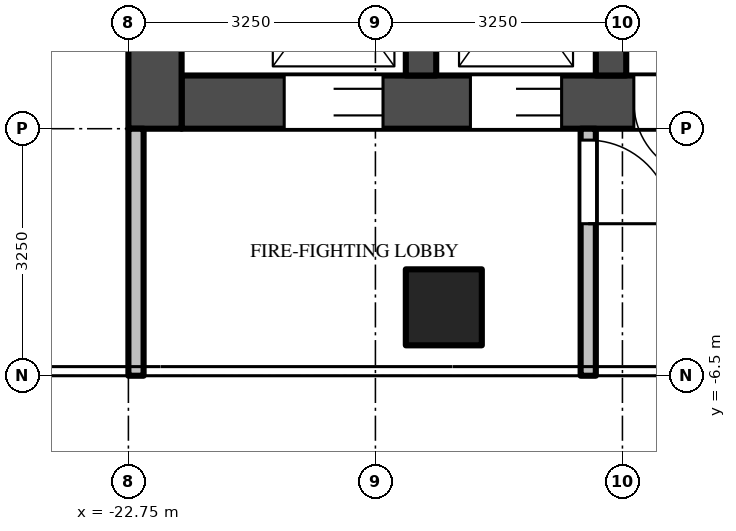
"""IFC4 building model, lengths in metres.
Left out: names, types, materials, properties, quantities, classifications, styles, units other than length and angle.
Written with IfcOpenShell. Run it as: python <this file> out.ifc"""

import sys

from ifc_helpers import new_model, si_unit, direction, frame, frame_2d, origin, origin_2d, place, context, subcontext, project, spatial, rectangle, extrude, source, transform, mapped, element, fill, save


model = new_model("IFC4")
c1 = context("Model", 3, precision=1e-05, world=origin(), true_north=direction((0.0, 1.0)))
c2 = subcontext(c1, "Body", "Model", "MODEL_VIEW")
j1 = project(units=[si_unit("LENGTHUNIT", "METRE"), si_unit("PLANEANGLEUNIT", "RADIAN")], contexts=[c1])
p1 = place(None, origin())
s1 = spatial("IfcSite", under=j1, at=p1, CompositionType="ELEMENT")
p2 = place(p1, origin())
s2 = spatial("IfcBuilding", under=s1, at=p2, CompositionType="ELEMENT")
p3 = place(p2, frame((0.0, 0.0, 271.4)))
s3 = spatial("IfcBuildingStorey", under=s2, at=p3, CompositionType="ELEMENT", Elevation=271.4)
m1 = source(origin(), c2, "Body", "SweptSolid", [
    extrude(rectangle(XDim=1.0, YDim=1.0, at=origin_2d()), origin(), (0.0, 0.0, 1.0), 8.0),
])
p4 = place(p3, frame((-18.6, -5.6, 0.0), z_axis=(0.0, 0.0, 1.0), x_axis=(1.0, 0.0, 0.0)))
e1 = element("IfcColumn", 1, at=p4, inside=s3, PredefinedType="COLUMN", context=c2, shape_type="MappedRepresentation", body=[
    mapped(m1, transform((0.0, 0.0, 0.0))),
])
m2 = source(origin(), c2, "Body", "SweptSolid", [
    extrude(rectangle(XDim=14.85, YDim=0.7, at=frame_2d((7.425, 0.0))), origin(), (0.0, 0.0, 1.0), 7.8),
])
p5 = place(p3, frame((-7.2, -2.9, 0.0), z_axis=(0.0, 0.0, 1.0), x_axis=(-1.0, 0.0, 0.0)))
e2 = element("IfcWall", 2, at=p5, inside=s3, PredefinedType="SHEAR", context=c2, shape_type="MappedRepresentation", body=[
    mapped(m2, transform((0.0, 0.0, 0.0))),
])
m3 = source(origin(), c2, "Body", "SweptSolid", [
    extrude(rectangle(XDim=1.2, YDim=2.1, at=frame_2d((0.6, 1.05))), frame((0.0, 0.36, 0.0), z_axis=(0.0, -1.0, 0.0), x_axis=(1.0, 0.0, 0.0)), (0.0, 0.0, 1.0), 0.72),
])
p6 = place(p5, frame((5.7, 0.0, 0.0)))
e3 = element("IfcOpeningElement", 3, at=p6, cuts=e2, PredefinedType="OPENING", context=c2, shape_type="MappedRepresentation", body=[
    mapped(m3, transform((0.0, 0.0, 0.0))),
])
m4 = source(origin(), c2, "Body", "SweptSolid", [
    extrude(rectangle(XDim=1.3, YDim=2.1, at=frame_2d((0.65, 1.05))), frame((0.0, 0.36, 0.0), z_axis=(0.0, -1.0, 0.0), x_axis=(1.0, 0.0, 0.0)), (0.0, 0.0, 1.0), 0.72),
])
p7 = place(p5, frame((12.2, 0.0, 0.0)))
e4 = element("IfcOpeningElement", 4, at=p7, cuts=e2, PredefinedType="OPENING", context=c2, shape_type="MappedRepresentation", body=[
    mapped(m4, transform((0.0, 0.0, 0.0))),
])
p8 = place(p5, frame((9.85, 0.0, 0.0)))
e5 = element("IfcOpeningElement", 5, at=p8, cuts=e2, PredefinedType="OPENING", context=c2, shape_type="MappedRepresentation", body=[
    mapped(m3, transform((0.0, 0.0, 0.0))),
])
m5 = source(origin(), c2, "Body", "SweptSolid", [
    extrude(rectangle(XDim=1.0, YDim=2.1, at=frame_2d((0.5, 1.05))), frame((0.0, 0.36, 0.0), z_axis=(0.0, -1.0, 0.0), x_axis=(1.0, 0.0, 0.0)), (0.0, 0.0, 1.0), 0.72),
])
p9 = place(p5, frame((7.9, 0.0, 0.0)))
e6 = element("IfcOpeningElement", 6, at=p9, cuts=e2, PredefinedType="OPENING", context=c2, shape_type="MappedRepresentation", body=[
    mapped(m5, transform((0.0, 0.0, 0.0))),
])
m6 = source(origin(), c2, "Body", "SweptSolid", [
    extrude(rectangle(XDim=9.05, YDim=0.7, at=frame_2d((4.525, 0.0))), origin(), (0.0, 0.0, 1.0), 7.8),
])
p10 = place(p3, frame((-22.4, 5.8, 0.0), z_axis=(0.0, 0.0, 1.0), x_axis=(0.0, -1.0, 0.0)))
e7 = element("IfcWall", 7, at=p10, inside=s3, PredefinedType="SHEAR", context=c2, shape_type="MappedRepresentation", body=[
    mapped(m6, transform((0.0, 0.0, 0.0))),
])
m7 = source(origin(), c2, "Body", "SweptSolid", [
    extrude(rectangle(XDim=2.45, YDim=0.4, at=frame_2d((1.225, 0.0))), origin(), (0.0, 0.0, 1.0), 7.8),
])
for number, where, z_axis, x_axis in (
    (8, (-16.4, -0.1, 0.0), (0.0, 0.0, 1.0), (0.0, -1.0, 0.0)),
    (9, (-18.9, -0.1, 0.0), (0.0, 0.0, 1.0), (0.0, -1.0, 0.0)),
):
    element("IfcWall", number, at=place(p3, frame(where, z_axis=z_axis, x_axis=x_axis)), inside=s3, PredefinedType="SHEAR", context=c2, shape_type="MappedRepresentation", body=[
        mapped(m7, transform((0.0, 0.0, 0.0))),
    ])
m8 = source(origin(), c2, "Body", "SweptSolid", [
    extrude(rectangle(XDim=3.25, YDim=0.2, at=frame_2d((1.625, 0.0))), origin(), (0.0, 0.0, 1.0), 7.8),
])
p11 = place(p3, frame((-16.7, -3.25, 0.0), z_axis=(0.0, 0.0, 1.0), x_axis=(0.0, -1.0, 0.0)))
e10 = element("IfcWall", 10, at=p11, inside=s3, PredefinedType="PARTITIONING", context=c2, shape_type="MappedRepresentation", body=[
    mapped(m8, transform((0.0, 0.0, 0.0))),
])
m9 = source(origin(), c2, "Body", "SweptSolid", [
    extrude(rectangle(XDim=1.1, YDim=2.1, at=frame_2d((0.55, 1.05))), frame((0.0, 0.11, 0.0), z_axis=(0.0, -1.0, 0.0), x_axis=(1.0, 0.0, 0.0)), (0.0, 0.0, 1.0), 0.22),
])
p12 = place(p11, frame((0.15, 0.0, 0.0)))
e11 = element("IfcOpeningElement", 11, at=p12, cuts=e10, PredefinedType="OPENING", context=c2, shape_type="MappedRepresentation", body=[
    mapped(m9, transform((0.0, 0.0, 0.0))),
])
p13 = place(p3, frame((-22.65, -3.25, 0.0), z_axis=(0.0, 0.0, 1.0), x_axis=(0.0, -1.0, 0.0)))
e12 = element("IfcWall", 12, at=p13, inside=s3, PredefinedType="PARTITIONING", context=c2, shape_type="MappedRepresentation", body=[
    mapped(m8, transform((0.0, 0.0, 0.0))),
])
m10 = source(origin(), c2, "Body", "SweptSolid", [
    extrude(rectangle(XDim=1.3, YDim=2.1, at=frame_2d((0.65, 1.05))), frame((0.0, -0.275, 0.0), z_axis=(0.0, -1.0, 0.0), x_axis=(1.0, 0.0, 0.0)), (0.0, 0.0, 1.0), 0.05),
])
p14 = place(p7, origin())
e13 = element("IfcDoor", 13, at=p14, inside=s3, OperationType="DOUBLE_DOOR_SLIDING", PredefinedType="DOOR", context=c2, shape_type="MappedRepresentation", body=[
    mapped(m10, transform((0.0, 0.0, 0.0))),
])
fill(e4, e13)
m11 = source(origin(), c2, "Body", "SweptSolid", [
    extrude(rectangle(XDim=1.2, YDim=2.1, at=frame_2d((0.6, 1.05))), frame((0.0, -0.275, 0.0), z_axis=(0.0, -1.0, 0.0), x_axis=(1.0, 0.0, 0.0)), (0.0, 0.0, 1.0), 0.05),
])
p15 = place(p8, origin())
e14 = element("IfcDoor", 14, at=p15, inside=s3, OperationType="DOUBLE_DOOR_SLIDING", PredefinedType="DOOR", context=c2, shape_type="MappedRepresentation", body=[
    mapped(m11, transform((0.0, 0.0, 0.0))),
])
fill(e5, e14)
m12 = source(origin(), c2, "Body", "SweptSolid", [
    extrude(rectangle(XDim=1.0, YDim=2.1, at=frame_2d((0.5, 1.05))), frame((0.0, -0.275, 0.0), z_axis=(0.0, -1.0, 0.0), x_axis=(1.0, 0.0, 0.0)), (0.0, 0.0, 1.0), 0.05),
])
p16 = place(p9, origin())
e15 = element("IfcDoor", 15, at=p16, inside=s3, OperationType="SINGLE_SWING_LEFT", PredefinedType="DOOR", context=c2, shape_type="MappedRepresentation", body=[
    mapped(m12, transform((0.0, 0.0, 0.0))),
])
fill(e6, e15)
m13 = source(origin(), c2, "Body", "SweptSolid", [
    extrude(rectangle(XDim=1.1, YDim=2.1, at=frame_2d((0.55, 1.05))), frame((0.0, 0.025, 0.0), z_axis=(0.0, -1.0, 0.0), x_axis=(1.0, 0.0, 0.0)), (0.0, 0.0, 1.0), 0.05),
])
p17 = place(p12, origin())
e16 = element("IfcDoor", 16, at=p17, inside=s3, OperationType="SINGLE_SWING_RIGHT", PredefinedType="DOOR", context=c2, shape_type="MappedRepresentation", body=[
    mapped(m13, transform((0.0, 0.0, 0.0))),
])
fill(e11, e16)
save(model, sys.argv[1])
